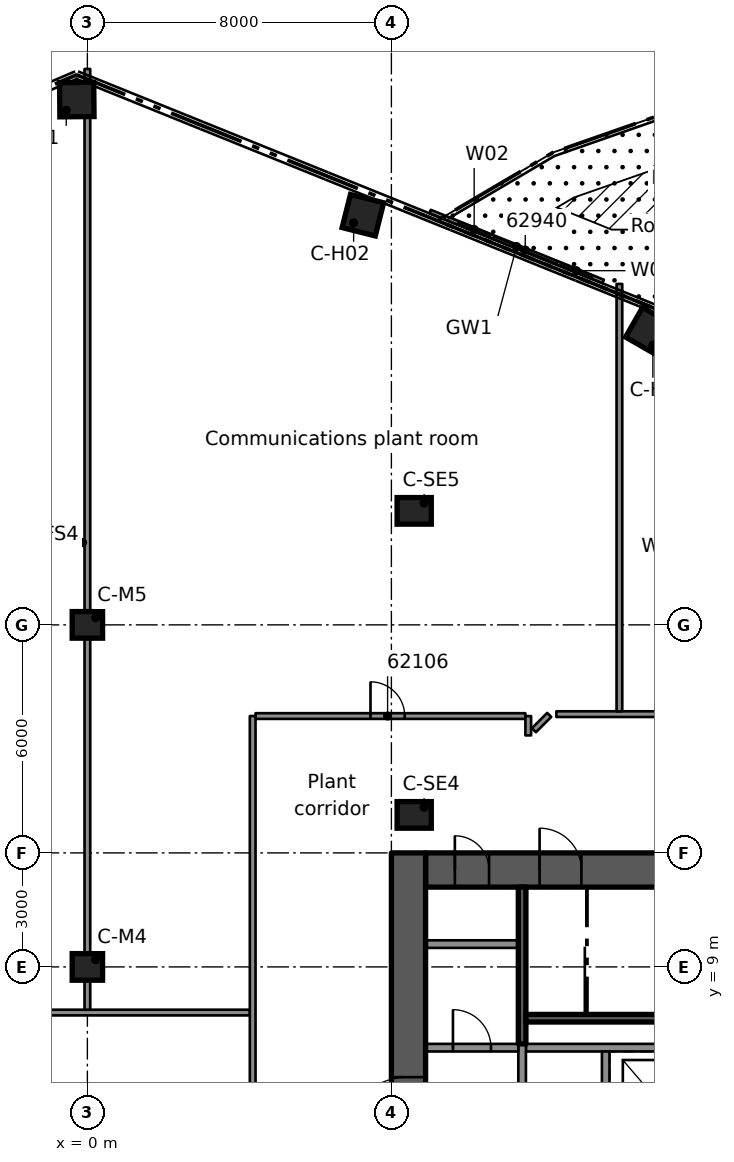
"""IFC4 building model, lengths in metres.
Left out: names, types, materials, properties, quantities, classifications, styles, units other than length and angle.
Written with IfcOpenShell. Run it as: python <this file> out.ifc"""

import sys

from ifc_helpers import new_model, si_unit, direction, frame, frame_2d, origin, origin_2d, place, context, subcontext, project, spatial, rectangle, extrude, element, fill, save


model = new_model("IFC4")
c1 = context("Model", 3, precision=1e-05, world=origin(), true_north=direction((0.0, 1.0)))
c2 = subcontext(c1, "Body", "Model", "MODEL_VIEW")
j1 = project(units=[si_unit("LENGTHUNIT", "METRE"), si_unit("PLANEANGLEUNIT", "RADIAN")], contexts=[c1])
p1 = place(None, origin())
s1 = spatial("IfcSite", under=j1, at=p1, CompositionType="ELEMENT")
p2 = place(p1, origin())
s2 = spatial("IfcBuilding", under=s1, at=p2, CompositionType="ELEMENT")
p3 = place(p2, frame((0.0, 0.0, 299.9)))
s3 = spatial("IfcBuildingStorey", under=s2, at=p3, CompositionType="ELEMENT", Elevation=299.9)
p4 = place(p3, frame((8.9, 11.55, 0.0), z_axis=(0.0, 0.0, 1.0), x_axis=(1.0, 0.0, 0.0)))
e1 = element("IfcWall", 1, at=p4, inside=s3, PredefinedType="SHEAR", context=c2, shape_type="SweptSolid", body=[
    extrude(rectangle(XDim=9.2, YDim=0.9, at=frame_2d((4.6, 0.0))), origin(), (0.0, 0.0, 1.0), 4.4),
])
p5 = place(p4, frame((3.0, 0.0, 0.0)))
e2 = element("IfcOpeningElement", 2, at=p5, cuts=e1, PredefinedType="OPENING", context=c2, shape_type="SweptSolid", body=[
    extrude(rectangle(XDim=1.1, YDim=2.1, at=frame_2d((0.55, 1.05))), frame((0.0, 0.46, 0.0), z_axis=(0.0, -1.0, 0.0), x_axis=(1.0, 0.0, 0.0)), (0.0, 0.0, 1.0), 0.92),
])
p6 = place(p4, frame((0.77, 0.0, 0.0)))
e3 = element("IfcOpeningElement", 3, at=p6, cuts=e1, PredefinedType="OPENING", context=c2, shape_type="SweptSolid", body=[
    extrude(rectangle(XDim=0.9, YDim=2.1, at=frame_2d((0.45, 1.05))), frame((0.0, 0.46, 0.0), z_axis=(0.0, -1.0, 0.0), x_axis=(1.0, 0.0, 0.0)), (0.0, 0.0, 1.0), 0.92),
])
p7 = place(p3, frame((8.45, -12.0, 0.0), z_axis=(0.0, 0.0, 1.0), x_axis=(0.0, 1.0, 0.0)))
e4 = element("IfcWall", 4, at=p7, inside=s3, PredefinedType="SHEAR", context=c2, shape_type="SweptSolid", body=[
    extrude(rectangle(XDim=24.0, YDim=0.9, at=frame_2d((12.0, 0.0))), origin(), (0.0, 0.0, 1.0), 4.4),
])
p8 = place(p7, frame((12.6, 0.0, 0.0)))
e5 = element("IfcOpeningElement", 5, at=p8, cuts=e4, PredefinedType="OPENING", context=c2, shape_type="SweptSolid", body=[
    extrude(rectangle(XDim=1.8, YDim=2.1, at=frame_2d((0.9, 1.05))), frame((0.0, 0.46, 0.0), z_axis=(0.0, -1.0, 0.0), x_axis=(1.0, 0.0, 0.0)), (0.0, 0.0, 1.0), 0.92),
])
p9 = place(p7, frame((16.3, 0.0, 0.0)))
e6 = element("IfcOpeningElement", 6, at=p9, cuts=e4, PredefinedType="OPENING", context=c2, shape_type="SweptSolid", body=[
    extrude(rectangle(XDim=1.8, YDim=2.1, at=frame_2d((0.9, 1.05))), frame((0.0, 0.46, 0.0), z_axis=(0.0, -1.0, 0.0), x_axis=(1.0, 0.0, 0.0)), (0.0, 0.0, 1.0), 0.92),
])
p10 = place(p7, frame((9.6, 0.0, 0.0)))
e7 = element("IfcOpeningElement", 7, at=p10, cuts=e4, PredefinedType="OPENING", context=c2, shape_type="SweptSolid", body=[
    extrude(rectangle(XDim=1.8, YDim=2.1, at=frame_2d((0.9, 1.05))), frame((0.0, 0.46, 0.0), z_axis=(0.0, -1.0, 0.0), x_axis=(1.0, 0.0, 0.0)), (0.0, 0.0, 1.0), 0.92),
])
p11 = place(p7, frame((3.25, 0.0, 0.0)))
e8 = element("IfcOpeningElement", 8, at=p11, cuts=e4, PredefinedType="OPENING", context=c2, shape_type="SweptSolid", body=[
    extrude(rectangle(XDim=1.1, YDim=2.1, at=frame_2d((0.55, 1.05))), frame((0.0, 0.46, 0.0), z_axis=(0.0, -1.0, 0.0), x_axis=(1.0, 0.0, 0.0)), (0.0, 0.0, 1.0), 0.92),
])
for number, where, z_axis, x_axis in (
    (9, (-0.278, 31.821, 0.0), (0.0, 0.0, 1.0), (-0.009, 1.0, 0.0)),
    (10, (7.25, 28.78, 0.0), (0.0, 0.0, 1.0), (0.244, 0.97, 0.0)),
    (11, (14.777, 25.739, 0.0), (0.0, 0.0, 1.0), (0.498, 0.867, 0.0)),
):
    element("IfcColumn", number, at=place(p3, frame(where, z_axis=z_axis, x_axis=x_axis)), inside=s3, PredefinedType="COLUMN", context=c2, shape_type="SweptSolid", body=[
        extrude(rectangle(XDim=0.9, YDim=0.9, at=origin_2d()), origin(), (0.0, 0.0, 1.0), 4.4),
    ])
for number, where, z_axis, x_axis in (
    (12, (0.0, 9.0, 0.0), (0.0, 0.0, 1.0), (1.0, 0.0, 0.0)),
    (13, (0.0, 18.0, 0.0), (0.0, 0.0, 1.0), (1.0, 0.0, 0.0)),
):
    element("IfcColumn", number, at=place(p3, frame(where, z_axis=z_axis, x_axis=x_axis)), inside=s3, PredefinedType="COLUMN", context=c2, shape_type="SweptSolid", body=[
        extrude(rectangle(XDim=0.8, YDim=0.7, at=origin_2d()), origin(), (0.0, 0.0, 1.0), 4.4),
    ])
for number, where, z_axis, x_axis in (
    (14, (8.6, 13.0, 0.0), (0.0, 0.0, 1.0), (1.0, 0.0, 0.0)),
    (15, (8.6, 21.0, 0.0), (0.0, 0.0, 1.0), (1.0, 0.0, 0.0)),
):
    element("IfcColumn", number, at=place(p3, frame(where, z_axis=z_axis, x_axis=x_axis)), inside=s3, PredefinedType="COLUMN", context=c2, shape_type="SweptSolid", body=[
        extrude(rectangle(XDim=0.9, YDim=0.7, at=origin_2d()), origin(), (0.0, 0.0, 1.0), 4.4),
    ])
p12 = place(p3, frame((11.54, 6.875, 0.0), z_axis=(0.0, 0.0, 1.0), x_axis=(1.0, 0.0, 0.0)))
e16 = element("IfcWall", 16, at=p12, inside=s3, PredefinedType="SOLIDWALL", context=c2, shape_type="SweptSolid", body=[
    extrude(rectangle(XDim=6.56, YDim=0.2, at=frame_2d((3.28, 0.0))), origin(), (0.0, 0.0, 1.0), 3.98),
])
p13 = place(p3, frame((11.44, 6.975, 0.0), z_axis=(0.0, 0.0, 1.0), x_axis=(0.0, -1.0, 0.0)))
e17 = element("IfcWall", 17, at=p13, inside=s3, PredefinedType="SOLIDWALL", context=c2, shape_type="SweptSolid", body=[
    extrude(rectangle(XDim=13.95, YDim=0.2, at=frame_2d((6.975, 0.0))), origin(), (0.0, 0.0, 1.0), 3.98),
])
p14 = place(p13, frame((11.925, 0.0, 0.0)))
e18 = element("IfcOpeningElement", 18, at=p14, cuts=e17, PredefinedType="OPENING", context=c2, shape_type="SweptSolid", body=[
    extrude(rectangle(XDim=1.1, YDim=2.1, at=frame_2d((0.55, 1.05))), frame((0.0, 0.11, 0.0), z_axis=(0.0, -1.0, 0.0), x_axis=(1.0, 0.0, 0.0)), (0.0, 0.0, 1.0), 0.22),
])
p15 = place(p13, frame((1.075, 0.0, 0.0)))
e19 = element("IfcOpeningElement", 19, at=p15, cuts=e17, PredefinedType="OPENING", context=c2, shape_type="SweptSolid", body=[
    extrude(rectangle(XDim=0.8, YDim=2.1, at=frame_2d((0.4, 1.05))), frame((0.0, 0.11, 0.0), z_axis=(0.0, -1.0, 0.0), x_axis=(1.0, 0.0, 0.0)), (0.0, 0.0, 1.0), 0.22),
])
p16 = place(p13, frame((9.325, 0.0, 0.0)))
e20 = element("IfcOpeningElement", 20, at=p16, cuts=e17, PredefinedType="OPENING", context=c2, shape_type="SweptSolid", body=[
    extrude(rectangle(XDim=0.8, YDim=2.1, at=frame_2d((0.4, 1.05))), frame((0.0, 0.11, 0.0), z_axis=(0.0, -1.0, 0.0), x_axis=(1.0, 0.0, 0.0)), (0.0, 0.0, 1.0), 0.22),
])
p17 = place(p3, frame((13.64, 6.775, 0.0), z_axis=(0.0, 0.0, 1.0), x_axis=(0.0, -1.0, 0.0)))
e21 = element("IfcWall", 21, at=p17, inside=s3, PredefinedType="SOLIDWALL", context=c2, shape_type="SweptSolid", body=[
    extrude(rectangle(XDim=8.05, YDim=0.2, at=frame_2d((4.025, 0.0))), origin(), (0.0, 0.0, 1.0), 3.98),
])
p18 = place(p3, frame((11.44, 11.1, 0.0), z_axis=(0.0, 0.0, 1.0), x_axis=(0.0, -1.0, 0.0)))
e22 = element("IfcWall", 22, at=p18, inside=s3, PredefinedType="SOLIDWALL", context=c2, shape_type="SweptSolid", body=[
    extrude(rectangle(XDim=4.125, YDim=0.2, at=frame_2d((2.062, 0.0))), origin(), (0.0, 0.0, 1.0), 3.98),
])
p19 = place(p3, frame((11.54, 7.65, 0.0), z_axis=(0.0, 0.0, 1.0), x_axis=(1.0, 0.0, 0.0)))
e23 = element("IfcWall", 23, at=p19, inside=s3, PredefinedType="SOLIDWALL", context=c2, shape_type="SweptSolid", body=[
    extrude(rectangle(XDim=6.56, YDim=0.2, at=frame_2d((3.28, 0.0))), origin(), (0.0, 0.0, 1.0), 3.98),
])
p20 = place(p3, frame((8.9, 6.875, 0.0), z_axis=(0.0, 0.0, 1.0), x_axis=(1.0, 0.0, 0.0)))
e24 = element("IfcWall", 24, at=p20, inside=s3, PredefinedType="PARTITIONING", context=c2, shape_type="SweptSolid", body=[
    extrude(rectangle(XDim=2.44, YDim=0.2, at=frame_2d((1.22, 0.0))), origin(), (0.0, 0.0, 1.0), 3.98),
])
p21 = place(p20, frame((0.72, 0.0, 0.0)))
e25 = element("IfcOpeningElement", 25, at=p21, cuts=e24, PredefinedType="OPENING", context=c2, shape_type="SweptSolid", body=[
    extrude(rectangle(XDim=1.0, YDim=2.1, at=frame_2d((0.5, 1.05))), frame((0.0, 0.11, 0.0), z_axis=(0.0, -1.0, 0.0), x_axis=(1.0, 0.0, 0.0)), (0.0, 0.0, 1.0), 0.22),
])
p22 = place(p3, frame((8.9, 9.6, 0.0), z_axis=(0.0, 0.0, 1.0), x_axis=(1.0, 0.0, 0.0)))
e26 = element("IfcWall", 26, at=p22, inside=s3, PredefinedType="PARTITIONING", context=c2, shape_type="SweptSolid", body=[
    extrude(rectangle(XDim=2.44, YDim=0.2, at=frame_2d((1.22, 0.0))), origin(), (0.0, 0.0, 1.0), 3.98),
])
p23 = place(p3, frame((9.018, 28.875, 0.0), z_axis=(0.0, 0.0, 1.0), x_axis=(0.927195684574, -0.37457731179, 0.0)))
e27 = element("IfcWall", 27, at=p23, inside=s3, PredefinedType="STANDARD", context=c2, shape_type="SweptSolid", body=[
    extrude(rectangle(XDim=4.91, YDim=0.1, at=frame_2d((2.455, 0.0))), origin(), (0.0, 0.0, 1.0), 4.4),
])
p24 = place(p23, frame((1.801, 0.0, 0.0)))
e28 = element("IfcOpeningElement", 28, at=p24, cuts=e27, PredefinedType="OPENING", context=c2, shape_type="SweptSolid", body=[
    extrude(rectangle(XDim=1.8, YDim=2.4, at=frame_2d((0.9, 1.2))), frame((0.0, 0.06, 0.0), z_axis=(0.0, -1.0, 0.0), x_axis=(1.0, 0.0, 0.0)), (0.0, 0.0, 1.0), 0.12),
])
p25 = place(p23, frame((0.801, 0.0, 0.0)))
e29 = element("IfcOpeningElement", 29, at=p25, cuts=e27, PredefinedType="OPENING", context=c2, shape_type="SweptSolid", body=[
    extrude(rectangle(XDim=0.9, YDim=2.4, at=frame_2d((0.45, 1.2))), frame((0.0, 0.06, 0.0), z_axis=(0.0, -1.0, 0.0), x_axis=(1.0, 0.0, 0.0)), (0.0, 0.0, 1.0), 0.12),
])
p26 = place(p23, frame((3.701, 0.0, 0.0)))
e30 = element("IfcOpeningElement", 30, at=p26, cuts=e27, PredefinedType="OPENING", context=c2, shape_type="SweptSolid", body=[
    extrude(rectangle(XDim=0.9, YDim=2.4, at=frame_2d((0.45, 1.2))), frame((0.0, 0.06, 0.0), z_axis=(0.0, -1.0, 0.0), x_axis=(1.0, 0.0, 0.0)), (0.0, 0.0, 1.0), 0.12),
])
p27 = place(p3, frame((-4.274, 7.799, 0.0), z_axis=(0.0, 0.0, 1.0), x_axis=(1.0, 0.0, 0.0)))
e31 = element("IfcWall", 31, at=p27, inside=s3, PredefinedType="PARTITIONING", context=c2, shape_type="SweptSolid", body=[
    extrude(rectangle(XDim=8.549, YDim=0.15, at=frame_2d((4.274, 0.0))), origin(), (0.0, 0.0, 1.0), 3.98),
])
p28 = place(p3, frame((4.425, 15.601, 0.0), z_axis=(0.0, 0.0, 1.0), x_axis=(1.0, 0.0, 0.0)))
e32 = element("IfcWall", 32, at=p28, inside=s3, PredefinedType="PARTITIONING", context=c2, shape_type="SweptSolid", body=[
    extrude(rectangle(XDim=7.1, YDim=0.15, at=frame_2d((3.55, 0.0))), origin(), (0.0, 0.0, 1.0), 3.98),
])
p29 = place(p28, frame((3.025, 0.0, 0.0)))
e33 = element("IfcOpeningElement", 33, at=p29, cuts=e32, PredefinedType="OPENING", context=c2, shape_type="SweptSolid", body=[
    extrude(rectangle(XDim=0.9, YDim=2.1, at=frame_2d((0.45, 1.05))), frame((0.0, 0.085, 0.0), z_axis=(0.0, -1.0, 0.0), x_axis=(1.0, 0.0, 0.0)), (0.0, 0.0, 1.0), 0.17),
])
p30 = place(p3, frame((12.341, 15.651, 0.0), z_axis=(0.0, 0.0, 1.0), x_axis=(1.0, 0.0, 0.0)))
e34 = element("IfcWall", 34, at=p30, inside=s3, PredefinedType="PARTITIONING", context=c2, shape_type="SweptSolid", body=[
    extrude(rectangle(XDim=10.234, YDim=0.15, at=frame_2d((5.117, 0.0))), origin(), (0.0, 0.0, 1.0), 3.98),
])
p31 = place(p3, frame((11.75, 15.228, 0.0), z_axis=(0.0, 0.0, 1.0), x_axis=(0.707106781187, 0.707106781187, 0.0)))
e35 = element("IfcWall", 35, at=p31, inside=s3, PredefinedType="PARTITIONING", context=c2, shape_type="SweptSolid", body=[
    extrude(rectangle(XDim=0.57, YDim=0.15, at=frame_2d((0.285, 0.0))), origin(), (0.0, 0.0, 1.0), 3.98),
])
p32 = place(p3, frame((14.0, 15.726, 0.0), z_axis=(0.0, 0.0, 1.0), x_axis=(0.0, 1.0, 0.0)))
e36 = element("IfcWall", 36, at=p32, inside=s3, PredefinedType="PARTITIONING", context=c2, shape_type="SweptSolid", body=[
    extrude(rectangle(XDim=11.244, YDim=0.15, at=frame_2d((5.622, 0.0))), origin(), (0.0, 0.0, 1.0), 3.98),
])
p33 = place(p3, frame((11.601, 15.092, 0.0), z_axis=(0.0, 0.0, 1.0), x_axis=(0.0, 1.0, 0.0)))
e37 = element("IfcWall", 37, at=p33, inside=s3, PredefinedType="PARTITIONING", context=c2, shape_type="SweptSolid", body=[
    extrude(rectangle(XDim=0.508, YDim=0.15, at=frame_2d((0.254, 0.0))), origin(), (0.0, 0.0, 1.0), 3.98),
])
p34 = place(p3, frame((4.35, -15.6, 0.0), z_axis=(0.0, 0.0, 1.0), x_axis=(0.0, 1.0, 0.0)))
e38 = element("IfcWall", 38, at=p34, inside=s3, PredefinedType="PARTITIONING", context=c2, shape_type="SweptSolid", body=[
    extrude(rectangle(XDim=31.201, YDim=0.15, at=frame_2d((15.601, 0.0))), origin(), (0.0, 0.0, 1.0), 3.98),
])
p35 = place(p34, frame((3.35, 0.0, 0.0)))
e39 = element("IfcOpeningElement", 39, at=p35, cuts=e38, PredefinedType="OPENING", context=c2, shape_type="SweptSolid", body=[
    extrude(rectangle(XDim=0.9, YDim=2.1, at=frame_2d((0.45, 1.05))), frame((0.0, 0.085, 0.0), z_axis=(0.0, -1.0, 0.0), x_axis=(1.0, 0.0, 0.0)), (0.0, 0.0, 1.0), 0.17),
])
p36 = place(p3, frame((0.0, 7.874, 0.0), z_axis=(0.0, 0.0, 1.0), x_axis=(0.0, 1.0, 0.0)))
e40 = element("IfcWall", 40, at=p36, inside=s3, PredefinedType="PARTITIONING", context=c2, shape_type="SweptSolid", body=[
    extrude(rectangle(XDim=24.753, YDim=0.15, at=frame_2d((12.376, 0.0))), origin(), (0.0, 0.0, 1.0), 3.98),
])
p37 = place(p9, origin())
e41 = element("IfcDoor", 41, at=p37, inside=s3, OperationType="SINGLE_SWING_RIGHT", PredefinedType="DOOR", context=c2, shape_type="SweptSolid", body=[
    extrude(rectangle(XDim=1.8, YDim=2.1, at=frame_2d((0.9, 1.05))), frame((0.0, 0.025, 0.0), z_axis=(0.0, -1.0, 0.0), x_axis=(1.0, 0.0, 0.0)), (0.0, 0.0, 1.0), 0.05),
])
fill(e6, e41)
p38 = place(p5, origin())
e42 = element("IfcDoor", 42, at=p38, inside=s3, OperationType="SINGLE_SWING_LEFT", PredefinedType="DOOR", context=c2, shape_type="SweptSolid", body=[
    extrude(rectangle(XDim=1.1, YDim=2.1, at=frame_2d((0.55, 1.05))), frame((0.0, 0.025, 0.0), z_axis=(0.0, -1.0, 0.0), x_axis=(1.0, 0.0, 0.0)), (0.0, 0.0, 1.0), 0.05),
])
fill(e2, e42)
p39 = place(p6, origin())
e43 = element("IfcDoor", 43, at=p39, inside=s3, OperationType="SINGLE_SWING_LEFT", PredefinedType="DOOR", context=c2, shape_type="SweptSolid", body=[
    extrude(rectangle(XDim=0.9, YDim=2.1, at=frame_2d((0.45, 1.05))), frame((0.0, 0.025, 0.0), z_axis=(0.0, -1.0, 0.0), x_axis=(1.0, 0.0, 0.0)), (0.0, 0.0, 1.0), 0.05),
])
fill(e3, e43)
p40 = place(p21, origin())
e44 = element("IfcDoor", 44, at=p40, inside=s3, OperationType="SINGLE_SWING_RIGHT", PredefinedType="DOOR", context=c2, shape_type="SweptSolid", body=[
    extrude(rectangle(XDim=1.0, YDim=2.1, at=frame_2d((0.5, 1.05))), frame((0.0, 0.025, 0.0), z_axis=(0.0, -1.0, 0.0), x_axis=(1.0, 0.0, 0.0)), (0.0, 0.0, 1.0), 0.05),
])
fill(e25, e44)
p41 = place(p24, origin())
e45 = element("IfcDoor", 45, at=p41, inside=s3, OperationType="DOUBLE_DOOR_SLIDING", PredefinedType="DOOR", context=c2, shape_type="SweptSolid", body=[
    extrude(rectangle(XDim=1.8, YDim=2.4, at=frame_2d((0.9, 1.2))), frame((0.0, 0.025, 0.0), z_axis=(0.0, -1.0, 0.0), x_axis=(1.0, 0.0, 0.0)), (0.0, 0.0, 1.0), 0.05),
])
fill(e28, e45)
p42 = place(p25, origin())
e46 = element("IfcWindow", 46, at=p42, inside=s3, PartitioningType="SINGLE_PANEL", PredefinedType="WINDOW", context=c2, shape_type="SweptSolid", body=[
    extrude(rectangle(XDim=0.9, YDim=2.4, at=frame_2d((0.45, 1.2))), frame((0.0, 0.03, 0.0), z_axis=(0.0, -1.0, 0.0), x_axis=(1.0, 0.0, 0.0)), (0.0, 0.0, 1.0), 0.06),
])
fill(e29, e46)
p43 = place(p26, origin())
e47 = element("IfcWindow", 47, at=p43, inside=s3, PartitioningType="SINGLE_PANEL", PredefinedType="WINDOW", context=c2, shape_type="SweptSolid", body=[
    extrude(rectangle(XDim=0.9, YDim=2.4, at=frame_2d((0.45, 1.2))), frame((0.0, 0.03, 0.0), z_axis=(0.0, -1.0, 0.0), x_axis=(1.0, 0.0, 0.0)), (0.0, 0.0, 1.0), 0.06),
])
fill(e30, e47)
p44 = place(p29, origin())
e48 = element("IfcDoor", 48, at=p44, inside=s3, OperationType="SINGLE_SWING_LEFT", PredefinedType="DOOR", context=c2, shape_type="SweptSolid", body=[
    extrude(rectangle(XDim=0.9, YDim=2.1, at=frame_2d((0.45, 1.05))), frame((0.0, 0.025, 0.0), z_axis=(0.0, -1.0, 0.0), x_axis=(1.0, 0.0, 0.0)), (0.0, 0.0, 1.0), 0.05),
])
fill(e33, e48)
save(model, sys.argv[1])
